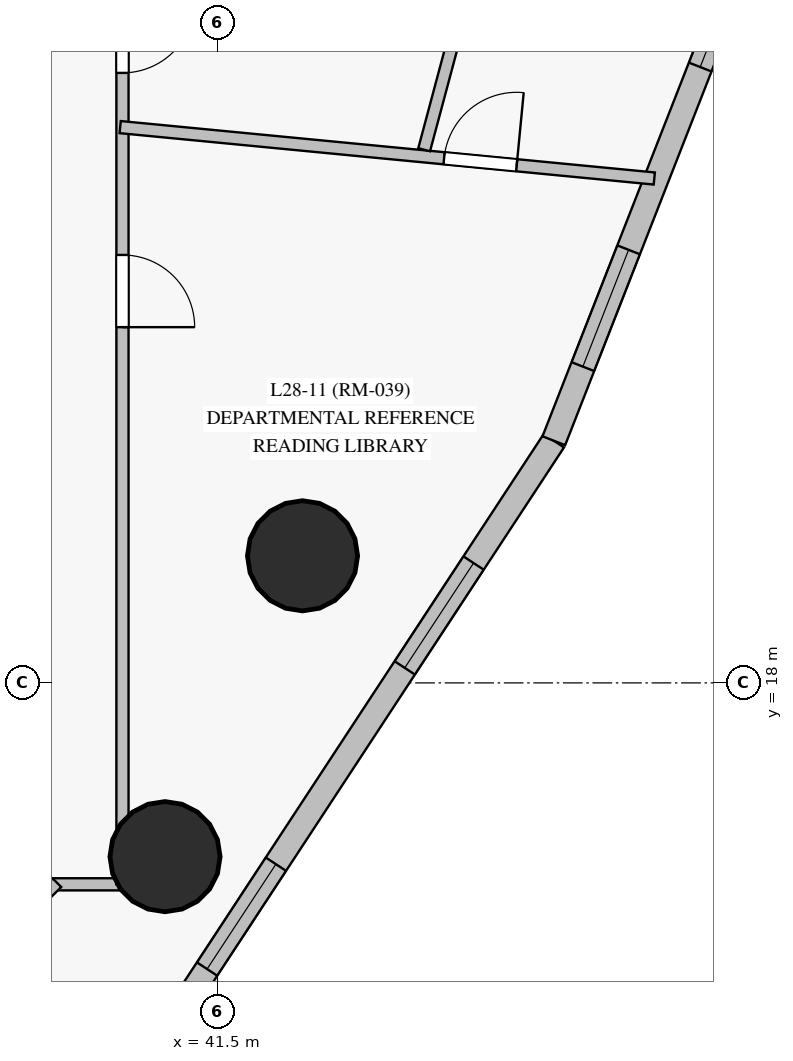
"""IFC4 building model, lengths in metres.
Left out: names, types, materials, properties, quantities, classifications, styles, units other than length and angle.
Written with IfcOpenShell. Run it as: python <this file> out.ifc"""

import sys

from ifc_helpers import new_model, si_unit, direction, frame, frame_2d, origin, origin_with_axes, origin_2d, place, context, subcontext, project, spatial, rectangle, circle, extrude, source, transform, mapped, element, fill, save


model = new_model("IFC4")
c1 = context("Model", 3, precision=1e-05, world=origin(), true_north=direction((0.0, 1.0)))
c2 = subcontext(c1, "Body", "Model", "MODEL_VIEW")
j1 = project(units=[si_unit("LENGTHUNIT", "METRE"), si_unit("PLANEANGLEUNIT", "RADIAN")], contexts=[c1])
p1 = place(None, origin())
s1 = spatial("IfcSite", under=j1, at=p1, CompositionType="ELEMENT")
p2 = place(p1, origin())
s2 = spatial("IfcBuilding", under=s1, at=p2, CompositionType="ELEMENT")
p3 = place(p2, frame((0.0, 0.0, 105.35)))
s3 = spatial("IfcBuildingStorey", under=s2, at=p3, CompositionType="ELEMENT", Elevation=105.35)
m1 = source(origin_with_axes(), c2, "Body", "SweptSolid", [
    extrude(circle(Radius=0.725, at=origin_2d()), origin(), (0.0, 0.0, 1.0), 3.05),
])
for number, where, z_axis, x_axis in (
    (1, (42.619, 19.672, 0.0), (0.0, 0.0, 1.0), (1.0, 0.0, 0.0)),
    (2, (40.81, 15.714, 0.0), (0.0, 0.0, 1.0), (1.0, 0.0, 0.0)),
):
    element("IfcColumn", number, at=place(p3, frame(where, z_axis=z_axis, x_axis=x_axis)), inside=s3, PredefinedType="COLUMN", context=c2, shape_type="MappedRepresentation", body=[
        mapped(m1, transform((0.0, 0.0, 0.0), scale=1.0)),
    ])
p4 = place(p3, frame((40.307, 12.627, 0.0), z_axis=(0.0, 0.0, 1.0), x_axis=(0.548726236676, 0.836002103576, 0.0)))
e3 = element("IfcWall", 3, at=p4, inside=s3, PredefinedType="SOLIDWALL", context=c2, shape_type="SweptSolid", body=[
    extrude(rectangle(XDim=10.238, YDim=0.32, at=frame_2d((5.119, 0.0))), origin(), (0.0, 0.0, 1.0), 2.825),
])
p5 = place(p4, frame((1.925, 0.0, 0.85)))
e4 = element("IfcOpeningElement", 4, at=p5, cuts=e3, PredefinedType="OPENING", context=c2, shape_type="SweptSolid", body=[
    extrude(rectangle(XDim=1.65, YDim=1.65, at=frame_2d((0.825, 0.825))), frame((0.0, 0.17, 0.0), z_axis=(0.0, -1.0, 0.0), x_axis=(1.0, 0.0, 0.0)), (0.0, 0.0, 1.0), 0.34),
])
p6 = place(p4, frame((6.664, 0.0, 0.85)))
e5 = element("IfcOpeningElement", 5, at=p6, cuts=e3, PredefinedType="OPENING", context=c2, shape_type="SweptSolid", body=[
    extrude(rectangle(XDim=1.65, YDim=1.65, at=frame_2d((0.825, 0.825))), frame((0.0, 0.17, 0.0), z_axis=(0.0, -1.0, 0.0), x_axis=(1.0, 0.0, 0.0)), (0.0, 0.0, 1.0), 0.34),
])
p7 = place(p3, frame((45.925, 21.186, 0.0), z_axis=(0.0, 0.0, 1.0), x_axis=(0.364698725117, 0.931125576868, 0.0)))
e6 = element("IfcWall", 6, at=p7, inside=s3, PredefinedType="SOLIDWALL", context=c2, shape_type="SweptSolid", body=[
    extrude(rectangle(XDim=14.728, YDim=0.32, at=frame_2d((7.364, 0.0))), origin(), (0.0, 0.0, 1.0), 2.825),
])
p8 = place(p7, frame((1.047, 0.0, 0.85)))
e7 = element("IfcOpeningElement", 7, at=p8, cuts=e6, PredefinedType="OPENING", context=c2, shape_type="SweptSolid", body=[
    extrude(rectangle(XDim=1.65, YDim=1.65, at=frame_2d((0.825, 0.825))), frame((0.0, 0.17, 0.0), z_axis=(0.0, -1.0, 0.0), x_axis=(1.0, 0.0, 0.0)), (0.0, 0.0, 1.0), 0.34),
])
p9 = place(p7, frame((5.28, 0.0, 0.85)))
e8 = element("IfcOpeningElement", 8, at=p9, cuts=e6, PredefinedType="OPENING", context=c2, shape_type="SweptSolid", body=[
    extrude(rectangle(XDim=1.65, YDim=1.65, at=frame_2d((0.825, 0.825))), frame((0.0, 0.17, 0.0), z_axis=(0.0, -1.0, 0.0), x_axis=(1.0, 0.0, 0.0)), (0.0, 0.0, 1.0), 0.34),
])
p10 = place(p7, frame((9.481, 0.0, 0.85)))
e9 = element("IfcOpeningElement", 9, at=p10, cuts=e6, PredefinedType="OPENING", context=c2, shape_type="SweptSolid", body=[
    extrude(rectangle(XDim=1.65, YDim=1.65, at=frame_2d((0.825, 0.825))), frame((0.0, 0.17, 0.0), z_axis=(0.0, -1.0, 0.0), x_axis=(1.0, 0.0, 0.0)), (0.0, 0.0, 1.0), 0.34),
])
p11 = place(p7, frame((13.222, 0.0, 0.85)))
e10 = element("IfcOpeningElement", 10, at=p11, cuts=e6, PredefinedType="OPENING", context=c2, shape_type="SweptSolid", body=[
    extrude(rectangle(XDim=0.95, YDim=1.5, at=frame_2d((0.475, 0.75))), frame((0.0, 0.17, 0.0), z_axis=(0.0, -1.0, 0.0), x_axis=(1.0, 0.0, 0.0)), (0.0, 0.0, 1.0), 0.34),
])
p12 = place(p3, frame((40.25, 15.35, 0.0), z_axis=(0.0, 0.0, 1.0), x_axis=(-1.0, 0.0, 0.0)))
e11 = element("IfcWall", 11, at=p12, inside=s3, PredefinedType="PARTITIONING", context=c2, shape_type="SweptSolid", body=[
    extrude(rectangle(XDim=29.75, YDim=0.16, at=frame_2d((14.875, 0.0))), origin(), (0.0, 0.0, 1.0), 2.225),
])
p13 = place(p12, frame((21.837, 0.0, 0.0)))
e12 = element("IfcOpeningElement", 12, at=p13, cuts=e11, PredefinedType="OPENING", context=c2, shape_type="SweptSolid", body=[
    extrude(rectangle(XDim=0.95, YDim=2.15, at=frame_2d((0.475, 1.075))), frame((0.0, 0.09, 0.0), z_axis=(0.0, -1.0, 0.0), x_axis=(1.0, 0.0, 0.0)), (0.0, 0.0, 1.0), 0.18),
])
p14 = place(p12, frame((18.722, 0.0, 0.0)))
e13 = element("IfcOpeningElement", 13, at=p14, cuts=e11, PredefinedType="OPENING", context=c2, shape_type="SweptSolid", body=[
    extrude(rectangle(XDim=0.95, YDim=2.15, at=frame_2d((0.475, 1.075))), frame((0.0, 0.09, 0.0), z_axis=(0.0, -1.0, 0.0), x_axis=(1.0, 0.0, 0.0)), (0.0, 0.0, 1.0), 0.18),
])
p15 = place(p12, frame((16.25, 0.0, 0.0)))
e14 = element("IfcOpeningElement", 14, at=p15, cuts=e11, PredefinedType="OPENING", context=c2, shape_type="SweptSolid", body=[
    extrude(rectangle(XDim=0.95, YDim=2.15, at=frame_2d((0.475, 1.075))), frame((0.0, 0.09, 0.0), z_axis=(0.0, -1.0, 0.0), x_axis=(1.0, 0.0, 0.0)), (0.0, 0.0, 1.0), 0.18),
])
p16 = place(p12, frame((14.4, 0.0, 0.0)))
e15 = element("IfcOpeningElement", 15, at=p16, cuts=e11, PredefinedType="OPENING", context=c2, shape_type="SweptSolid", body=[
    extrude(rectangle(XDim=0.95, YDim=2.15, at=frame_2d((0.475, 1.075))), frame((0.0, 0.09, 0.0), z_axis=(0.0, -1.0, 0.0), x_axis=(1.0, 0.0, 0.0)), (0.0, 0.0, 1.0), 0.18),
])
p17 = place(p12, frame((9.938, 0.0, 0.0)))
e16 = element("IfcOpeningElement", 16, at=p17, cuts=e11, PredefinedType="OPENING", context=c2, shape_type="SweptSolid", body=[
    extrude(rectangle(XDim=0.95, YDim=2.15, at=frame_2d((0.475, 1.075))), frame((0.0, 0.09, 0.0), z_axis=(0.0, -1.0, 0.0), x_axis=(1.0, 0.0, 0.0)), (0.0, 0.0, 1.0), 0.18),
])
p18 = place(p3, frame((40.25, 37.65, 0.0), z_axis=(0.0, 0.0, 1.0), x_axis=(0.0, -1.0, 0.0)))
e17 = element("IfcWall", 17, at=p18, inside=s3, PredefinedType="PARTITIONING", context=c2, shape_type="SweptSolid", body=[
    extrude(rectangle(XDim=22.3, YDim=0.16, at=frame_2d((11.15, 0.0))), origin(), (0.0, 0.0, 1.0), 2.225),
])
p19 = place(p18, frame((14.02, 0.0, 0.0)))
e18 = element("IfcOpeningElement", 18, at=p19, cuts=e17, PredefinedType="OPENING", context=c2, shape_type="SweptSolid", body=[
    extrude(rectangle(XDim=0.95, YDim=2.15, at=frame_2d((0.475, 1.075))), frame((0.0, 0.09, 0.0), z_axis=(0.0, -1.0, 0.0), x_axis=(1.0, 0.0, 0.0)), (0.0, 0.0, 1.0), 0.18),
])
p20 = place(p18, frame((10.675, 0.0, 0.0)))
e19 = element("IfcOpeningElement", 19, at=p20, cuts=e17, PredefinedType="OPENING", context=c2, shape_type="SweptSolid", body=[
    extrude(rectangle(XDim=0.95, YDim=2.15, at=frame_2d((0.475, 1.075))), frame((0.0, 0.09, 0.0), z_axis=(0.0, -1.0, 0.0), x_axis=(1.0, 0.0, 0.0)), (0.0, 0.0, 1.0), 0.18),
])
p21 = place(p18, frame((6.207, 0.0, 0.0)))
e20 = element("IfcOpeningElement", 20, at=p21, cuts=e17, PredefinedType="OPENING", context=c2, shape_type="SweptSolid", body=[
    extrude(rectangle(XDim=0.95, YDim=2.15, at=frame_2d((0.475, 1.075))), frame((0.0, 0.09, 0.0), z_axis=(0.0, -1.0, 0.0), x_axis=(1.0, 0.0, 0.0)), (0.0, 0.0, 1.0), 0.18),
])
p22 = place(p18, frame((4.298, 0.0, 0.0)))
e21 = element("IfcOpeningElement", 21, at=p22, cuts=e17, PredefinedType="OPENING", context=c2, shape_type="SweptSolid", body=[
    extrude(rectangle(XDim=0.95, YDim=2.15, at=frame_2d((0.475, 1.075))), frame((0.0, 0.09, 0.0), z_axis=(0.0, -1.0, 0.0), x_axis=(1.0, 0.0, 0.0)), (0.0, 0.0, 1.0), 0.18),
])
p23 = place(p18, frame((1.923, 0.0, 0.0)))
e22 = element("IfcOpeningElement", 22, at=p23, cuts=e17, PredefinedType="OPENING", context=c2, shape_type="SweptSolid", body=[
    extrude(rectangle(XDim=0.96, YDim=2.15, at=frame_2d((0.48, 1.075))), frame((0.0, 0.09, 0.0), z_axis=(0.0, -1.0, 0.0), x_axis=(1.0, 0.0, 0.0)), (0.0, 0.0, 1.0), 0.18),
])
p24 = place(p3, frame((40.22, 25.312, 0.0), z_axis=(0.0, 0.0, 1.0), x_axis=(0.995397172011, -0.095835640306, 0.0)))
e23 = element("IfcWall", 23, at=p24, inside=s3, PredefinedType="PARTITIONING", context=c2, shape_type="SweptSolid", body=[
    extrude(rectangle(XDim=7.059, YDim=0.16, at=frame_2d((3.53, 0.0))), origin(), (0.0, 0.0, 1.0), 2.825),
])
p25 = place(p24, frame((4.281, 0.0, 0.0)))
e24 = element("IfcOpeningElement", 24, at=p25, cuts=e23, PredefinedType="OPENING", context=c2, shape_type="SweptSolid", body=[
    extrude(rectangle(XDim=0.96, YDim=2.15, at=frame_2d((0.48, 1.075))), frame((0.0, 0.09, 0.0), z_axis=(0.0, -1.0, 0.0), x_axis=(1.0, 0.0, 0.0)), (0.0, 0.0, 1.0), 0.18),
])
p26 = place(p3, frame((39.388, 15.371, 0.0), z_axis=(0.0, 0.0, 1.0), x_axis=(-0.707137292148, -0.707076268909, 0.0)))
e25 = element("IfcWall", 25, at=p26, inside=s3, PredefinedType="PARTITIONING", context=c2, shape_type="SweptSolid", body=[
    extrude(rectangle(XDim=4.001, YDim=0.16, at=frame_2d((2.0, 0.0))), origin(), (0.0, 0.0, 1.0), 2.225),
])
p27 = place(p26, frame((1.525, 0.0, 0.0)))
e26 = element("IfcOpeningElement", 26, at=p27, cuts=e25, PredefinedType="OPENING", context=c2, shape_type="SweptSolid", body=[
    extrude(rectangle(XDim=0.96, YDim=2.15, at=frame_2d((0.48, 1.075))), frame((0.0, 0.09, 0.0), z_axis=(0.0, -1.0, 0.0), x_axis=(1.0, 0.0, 0.0)), (0.0, 0.0, 1.0), 0.18),
])
p28 = place(p3, frame((44.617, 26.5, 0.0), z_axis=(0.0, 0.0, 1.0), x_axis=(-0.258897414575, -0.965904823845, 0.0)))
e27 = element("IfcWall", 27, at=p28, inside=s3, PredefinedType="PARTITIONING", context=c2, shape_type="SweptSolid", body=[
    extrude(rectangle(XDim=1.538, YDim=0.16, at=frame_2d((0.769, 0.0))), origin(), (0.0, 0.0, 1.0), 2.825),
])
m2 = source(origin_with_axes(), c2, "Body", "SweptSolid", [
    extrude(rectangle(XDim=1.65, YDim=1.65, at=frame_2d((0.825, 0.825))), frame((0.0, 0.03, 0.0), z_axis=(0.0, -1.0, 0.0), x_axis=(1.0, 0.0, 0.0)), (0.0, 0.0, 1.0), 0.06),
])
p29 = place(p5, origin())
e28 = element("IfcWindow", 28, at=p29, inside=s3, PartitioningType="SINGLE_PANEL", PredefinedType="WINDOW", context=c2, shape_type="MappedRepresentation", body=[
    mapped(m2, transform((0.0, 0.0, 0.0), scale=1.0)),
])
fill(e4, e28)
p30 = place(p6, origin())
e29 = element("IfcWindow", 29, at=p30, inside=s3, PartitioningType="SINGLE_PANEL", PredefinedType="WINDOW", context=c2, shape_type="MappedRepresentation", body=[
    mapped(m2, transform((0.0, 0.0, 0.0), scale=1.0)),
])
fill(e5, e29)
p31 = place(p8, origin())
e30 = element("IfcWindow", 30, at=p31, inside=s3, PartitioningType="SINGLE_PANEL", PredefinedType="WINDOW", context=c2, shape_type="MappedRepresentation", body=[
    mapped(m2, transform((0.0, 0.0, 0.0), scale=1.0)),
])
fill(e7, e30)
p32 = place(p9, origin())
e31 = element("IfcWindow", 31, at=p32, inside=s3, PartitioningType="SINGLE_PANEL", PredefinedType="WINDOW", context=c2, shape_type="MappedRepresentation", body=[
    mapped(m2, transform((0.0, 0.0, 0.0), scale=1.0)),
])
fill(e8, e31)
m3 = source(origin_with_axes(), c2, "Body", "SweptSolid", [
    extrude(rectangle(XDim=0.95, YDim=2.15, at=frame_2d((0.475, 1.075))), frame((0.0, 0.025, 0.0), z_axis=(0.0, -1.0, 0.0), x_axis=(1.0, 0.0, 0.0)), (0.0, 0.0, 1.0), 0.05),
])
p33 = place(p19, origin())
e32 = element("IfcDoor", 32, at=p33, inside=s3, OperationType="SINGLE_SWING_RIGHT", PredefinedType="DOOR", context=c2, shape_type="MappedRepresentation", body=[
    mapped(m3, transform((0.0, 0.0, 0.0), scale=1.0)),
])
fill(e18, e32)
p34 = place(p20, origin())
e33 = element("IfcDoor", 33, at=p34, inside=s3, OperationType="SINGLE_SWING_LEFT", PredefinedType="DOOR", context=c2, shape_type="MappedRepresentation", body=[
    mapped(m3, transform((0.0, 0.0, 0.0), scale=1.0)),
])
fill(e19, e33)
m4 = source(origin_with_axes(), c2, "Body", "SweptSolid", [
    extrude(rectangle(XDim=0.96, YDim=2.15, at=frame_2d((0.48, 1.075))), frame((0.0, 0.025, 0.0), z_axis=(0.0, -1.0, 0.0), x_axis=(1.0, 0.0, 0.0)), (0.0, 0.0, 1.0), 0.05),
])
p35 = place(p25, origin())
e34 = element("IfcDoor", 34, at=p35, inside=s3, OperationType="SINGLE_SWING_RIGHT", PredefinedType="DOOR", context=c2, shape_type="MappedRepresentation", body=[
    mapped(m4, transform((0.0, 0.0, 0.0), scale=1.0)),
])
fill(e24, e34)
save(model, sys.argv[1])
